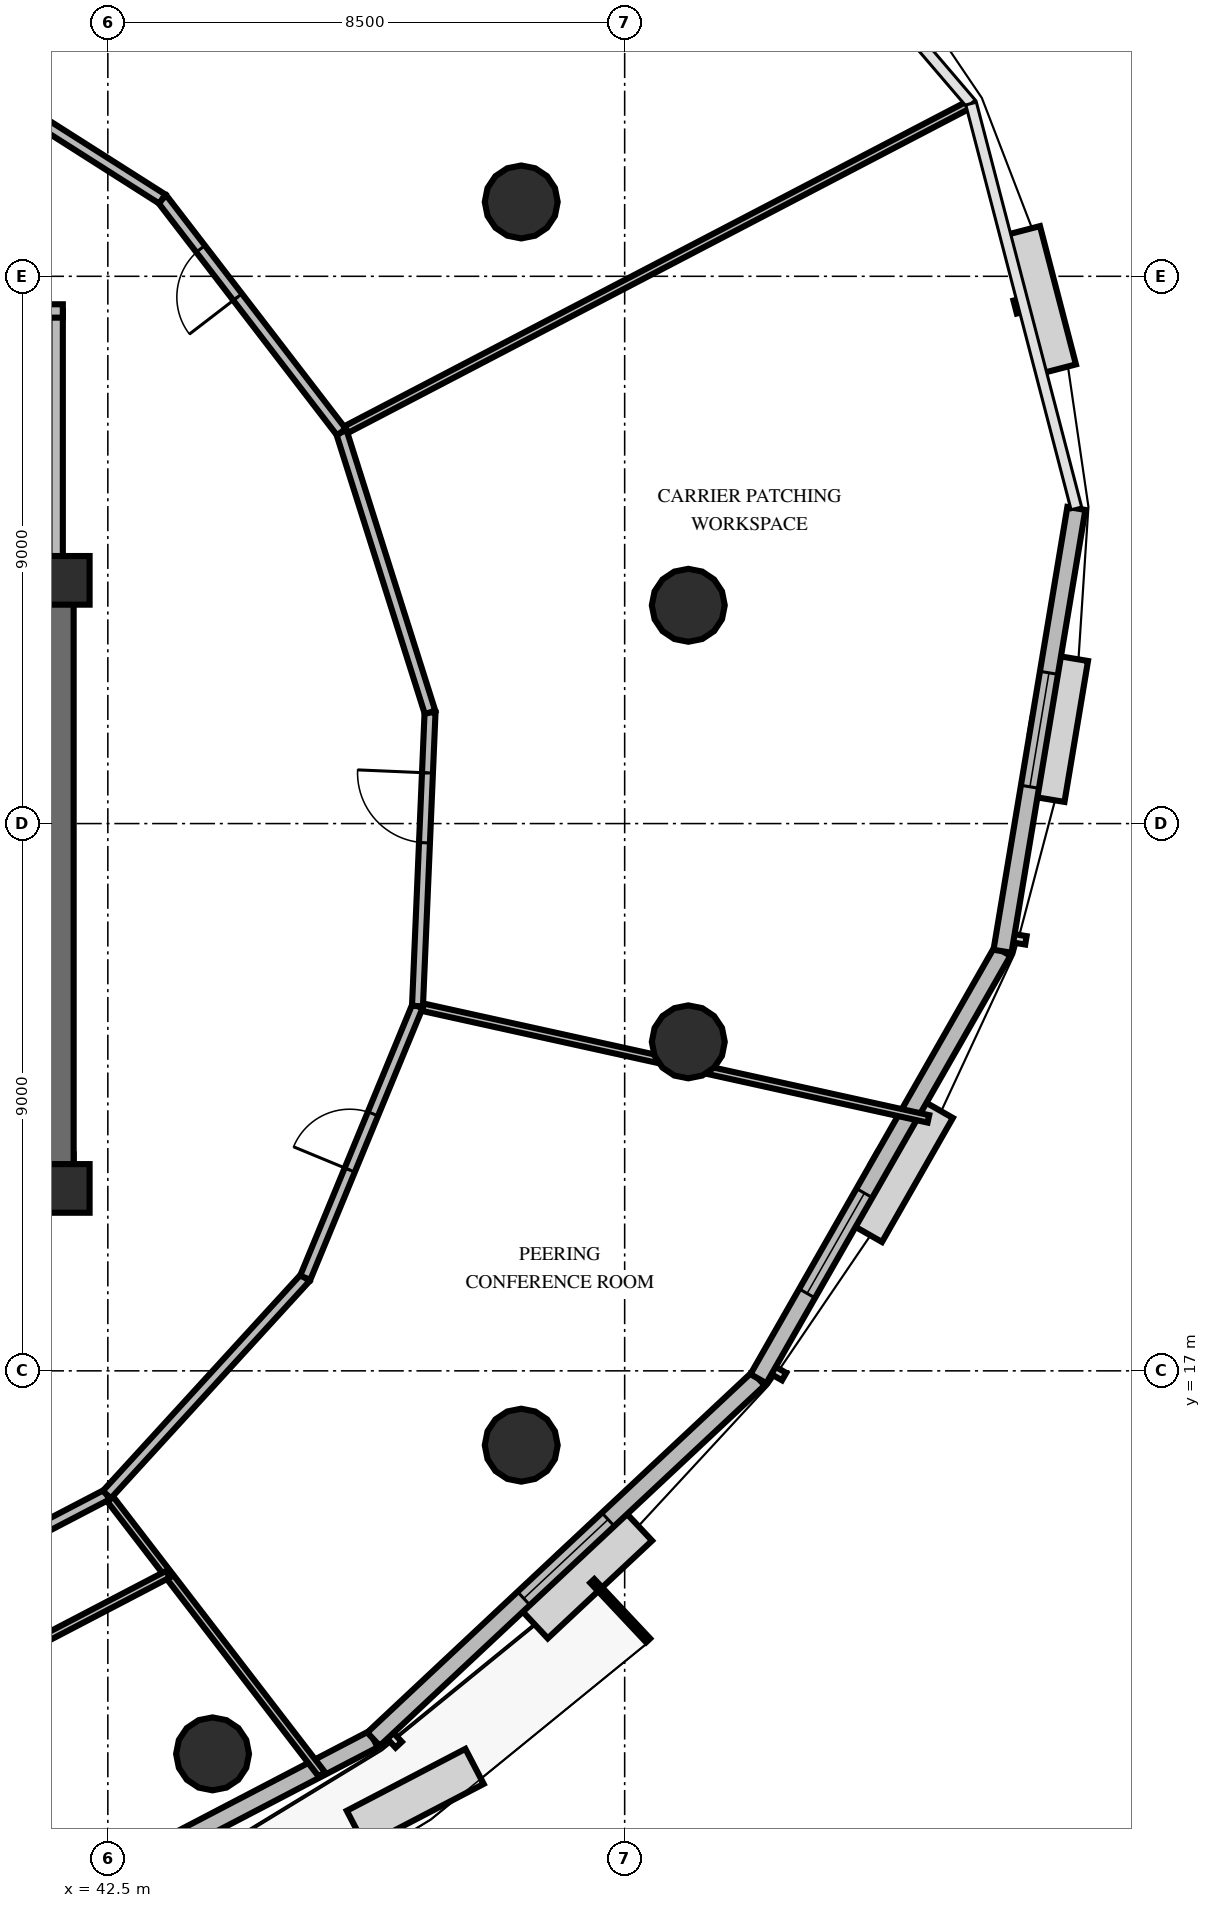
"""IFC4 building model, lengths in metres.
Left out: names, types, materials, properties, quantities, classifications, styles, units other than length and angle.
Written with IfcOpenShell. Run it as: python <this file> out.ifc"""

import sys

from ifc_helpers import new_model, si_unit, direction, frame, frame_2d, origin, origin_2d, place, context, subcontext, project, spatial, rectangle, circle, extrude, element, fill, save


model = new_model("IFC4")
c1 = context("Model", 3, precision=1e-05, world=origin(), true_north=direction((0.0, 1.0)))
c2 = subcontext(c1, "Body", "Model", "MODEL_VIEW")
j1 = project(units=[si_unit("LENGTHUNIT", "METRE"), si_unit("PLANEANGLEUNIT", "RADIAN")], contexts=[c1])
p1 = place(None, origin())
s1 = spatial("IfcSite", under=j1, at=p1, CompositionType="ELEMENT")
p2 = place(p1, origin())
s2 = spatial("IfcBuilding", under=s1, at=p2, CompositionType="ELEMENT")
p3 = place(p2, frame((0.0, 0.0, 149.8)))
s3 = spatial("IfcBuildingStorey", under=s2, at=p3, CompositionType="ELEMENT", Elevation=149.8)
p4 = place(p3, frame((26.072, 20.187, 0.0), z_axis=(0.0, 0.0, 1.0), x_axis=(1.0, 0.0, 0.0)))
e1 = element("IfcWall", 1, at=p4, inside=s3, PredefinedType="SHEAR", context=c2, shape_type="SweptSolid", body=[
    extrude(rectangle(XDim=15.866, YDim=0.75, at=frame_2d((7.933, 0.0))), origin(), (0.0, 0.0, 1.0), 4.0),
])
p5 = place(p3, frame((26.072, 30.013, 0.0), z_axis=(0.0, 0.0, 1.0), x_axis=(1.0, 0.0, 0.0)))
e2 = element("IfcWall", 2, at=p5, inside=s3, PredefinedType="SHEAR", context=c2, shape_type="SweptSolid", body=[
    extrude(rectangle(XDim=15.866, YDim=0.75, at=frame_2d((7.933, 0.0))), origin(), (0.0, 0.0, 1.0), 4.0),
])
p6 = place(p5, frame((0.878, 0.0, 0.0)))
e3 = element("IfcOpeningElement", 3, at=p6, cuts=e2, PredefinedType="OPENING", context=c2, shape_type="SweptSolid", body=[
    extrude(rectangle(XDim=1.05, YDim=2.15, at=frame_2d((0.525, 1.075))), frame((0.0, 0.385, 0.0), z_axis=(0.0, -1.0, 0.0), x_axis=(1.0, 0.0, 0.0)), (0.0, 0.0, 1.0), 0.77),
])
p7 = place(p5, frame((13.928, 0.0, 0.0)))
e4 = element("IfcOpeningElement", 4, at=p7, cuts=e2, PredefinedType="OPENING", context=c2, shape_type="SweptSolid", body=[
    extrude(rectangle(XDim=1.05, YDim=2.15, at=frame_2d((0.525, 1.075))), frame((0.0, 0.385, 0.0), z_axis=(0.0, -1.0, 0.0), x_axis=(1.0, 0.0, 0.0)), (0.0, 0.0, 1.0), 0.77),
])
p8 = place(p5, frame((7.378, 0.0, 0.0)))
e5 = element("IfcOpeningElement", 5, at=p8, cuts=e2, PredefinedType="OPENING", context=c2, shape_type="SweptSolid", body=[
    extrude(rectangle(XDim=1.1, YDim=2.15, at=frame_2d((0.55, 1.075))), frame((0.0, 0.385, 0.0), z_axis=(0.0, -1.0, 0.0), x_axis=(1.0, 0.0, 0.0)), (0.0, 0.0, 1.0), 0.77),
])
p9 = place(p3, frame((41.563, 19.812, 0.0), z_axis=(0.0, 0.0, 1.0), x_axis=(0.0, 1.0, 0.0)))
e6 = element("IfcWall", 6, at=p9, inside=s3, PredefinedType="SHEAR", context=c2, shape_type="SweptSolid", body=[
    extrude(rectangle(XDim=10.576, YDim=0.75, at=frame_2d((5.288, 0.0))), origin(), (0.0, 0.0, 1.0), 4.0),
])
for number, where, z_axis, x_axis in (
    (7, (41.8, 20.0, 0.0), (0.0, 0.0, 1.0), (1.0, 0.0, 0.0)),
    (8, (41.8, 30.0, 0.0), (0.0, 0.0, 1.0), (1.0, 0.0, 0.0)),
):
    element("IfcColumn", number, at=place(p3, frame(where, z_axis=z_axis, x_axis=x_axis)), inside=s3, PredefinedType="PILASTER", context=c2, shape_type="SweptSolid", body=[
        extrude(rectangle(XDim=0.8, YDim=0.8, at=origin_2d()), origin(), (0.0, 0.0, 1.0), 4.0),
    ])
for number, where, z_axis, x_axis in (
    (9, (52.046, 29.59, 0.0), (0.0, 0.0, 1.0), (1.0, 0.0, 0.0)),
    (10, (49.299, 36.222, 0.0), (0.0, 0.0, 1.0), (1.0, 0.0, 0.0)),
    (11, (44.222, 10.701, 0.0), (0.0, 0.0, 1.0), (1.0, 0.0, 0.0)),
    (12, (49.299, 15.778, 0.0), (0.0, 0.0, 1.0), (1.0, 0.0, 0.0)),
    (13, (52.046, 22.41, 0.0), (0.0, 0.0, 1.0), (1.0, 0.0, 0.0)),
):
    element("IfcColumn", number, at=place(p3, frame(where, z_axis=z_axis, x_axis=x_axis)), inside=s3, PredefinedType="COLUMN", context=c2, shape_type="SweptSolid", body=[
        extrude(circle(Radius=0.6, at=origin_2d()), origin(), (0.0, 0.0, 1.0), 4.0),
    ])
p10 = place(p3, frame((38.986, 6.83, 0.0), z_axis=(0.0, 0.0, 1.0), x_axis=(0.886600513761, 0.462535975897, 0.0)))
e14 = element("IfcWall", 14, at=p10, inside=s3, PredefinedType="SOLIDWALL", context=c2, shape_type="SweptSolid", body=[
    extrude(rectangle(XDim=8.891, YDim=0.3, at=frame_2d((4.445, 0.0))), origin(), (0.0, 0.0, 1.0), 2.9),
])
p11 = place(p10, frame((2.19, 0.0, 0.0)))
e15 = element("IfcOpeningElement", 15, at=p11, cuts=e14, PredefinedType="OPENING", context=c2, shape_type="SweptSolid", body=[
    extrude(rectangle(XDim=1.05, YDim=2.15, at=frame_2d((0.525, 1.075))), frame((0.0, 0.16, 0.0), z_axis=(0.0, -1.0, 0.0), x_axis=(1.0, 0.0, 0.0)), (0.0, 0.0, 1.0), 0.32),
])
p12 = place(p3, frame((46.869, 10.943, 0.0), z_axis=(0.0, 0.0, 1.0), x_axis=(0.729921586767, 0.683530889698, 0.0)))
e16 = element("IfcWall", 16, at=p12, inside=s3, PredefinedType="SOLIDWALL", context=c2, shape_type="SweptSolid", body=[
    extrude(rectangle(XDim=8.673, YDim=0.3, at=frame_2d((4.336, 0.0))), origin(), (0.0, 0.0, 1.0), 2.9),
])
p13 = place(p12, frame((3.386, 0.0, 0.8)))
e17 = element("IfcOpeningElement", 17, at=p13, cuts=e16, PredefinedType="OPENING", context=c2, shape_type="SweptSolid", body=[
    extrude(rectangle(XDim=1.9, YDim=1.95, at=frame_2d((0.95, 0.975))), frame((0.0, 0.16, 0.0), z_axis=(0.0, -1.0, 0.0), x_axis=(1.0, 0.0, 0.0)), (0.0, 0.0, 1.0), 0.32),
])
p14 = place(p3, frame((53.199, 16.871, 0.0), z_axis=(0.0, 0.0, 1.0), x_axis=(0.495931060513, 0.868361896457, 0.0)))
e18 = element("IfcWall", 18, at=p14, inside=s3, PredefinedType="SOLIDWALL", context=c2, shape_type="SweptSolid", body=[
    extrude(rectangle(XDim=8.095, YDim=0.3, at=frame_2d((4.048, 0.0))), origin(), (0.0, 0.0, 1.0), 2.9),
])
p15 = place(p14, frame((1.615, 0.0, 0.8)))
e19 = element("IfcOpeningElement", 19, at=p15, cuts=e18, PredefinedType="OPENING", context=c2, shape_type="SweptSolid", body=[
    extrude(rectangle(XDim=1.9, YDim=1.95, at=frame_2d((0.95, 0.975))), frame((0.0, 0.16, 0.0), z_axis=(0.0, -1.0, 0.0), x_axis=(1.0, 0.0, 0.0)), (0.0, 0.0, 1.0), 0.32),
])
p16 = place(p3, frame((57.214, 23.9, 0.0), z_axis=(0.0, 0.0, 1.0), x_axis=(0.16453840075, 0.986370678132, 0.0)))
e20 = element("IfcWall", 20, at=p16, inside=s3, PredefinedType="SOLIDWALL", context=c2, shape_type="SweptSolid", body=[
    extrude(rectangle(XDim=7.383, YDim=0.3, at=frame_2d((3.692, 0.0))), origin(), (0.0, 0.0, 1.0), 2.9),
])
p17 = place(p16, frame((2.742, 0.0, 0.8)))
e21 = element("IfcOpeningElement", 21, at=p17, cuts=e20, PredefinedType="OPENING", context=c2, shape_type="SweptSolid", body=[
    extrude(rectangle(XDim=1.9, YDim=1.95, at=frame_2d((0.95, 0.975))), frame((0.0, 0.16, 0.0), z_axis=(0.0, -1.0, 0.0), x_axis=(1.0, 0.0, 0.0)), (0.0, 0.0, 1.0), 0.32),
])
p18 = place(p3, frame((41.65, 30.05, 0.0), z_axis=(0.0, 0.0, 1.0), x_axis=(0.0, 1.0, 0.0)))
e22 = element("IfcWall", 22, at=p18, inside=s3, PredefinedType="SOLIDWALL", context=c2, shape_type="SweptSolid", body=[
    extrude(rectangle(XDim=4.38, YDim=0.22, at=frame_2d((2.19, 0.0))), origin(), (0.0, 0.0, 1.0), 2.8),
])
p19 = place(p3, frame((37.45, 34.43, 0.0), z_axis=(0.0, 0.0, 1.0), x_axis=(1.0, 0.0, 0.0)))
e23 = element("IfcWall", 23, at=p19, inside=s3, PredefinedType="SOLIDWALL", context=c2, shape_type="SweptSolid", body=[
    extrude(rectangle(XDim=4.31, YDim=0.22, at=frame_2d((2.155, 0.0))), origin(), (0.0, 0.0, 1.0), 2.8),
])
p20 = place(p19, frame((1.6, 0.0, 0.0)))
e24 = element("IfcOpeningElement", 24, at=p20, cuts=e23, PredefinedType="OPENING", context=c2, shape_type="SweptSolid", body=[
    extrude(rectangle(XDim=1.1, YDim=2.15, at=frame_2d((0.55, 1.075))), frame((0.0, 0.12, 0.0), z_axis=(0.0, -1.0, 0.0), x_axis=(1.0, 0.0, 0.0)), (0.0, 0.0, 1.0), 0.24),
])
p21 = place(p3, frame((42.484, 14.964, 0.0), z_axis=(0.0, 0.0, 1.0), x_axis=(0.609448463094, -0.792825687546, 0.0)))
e25 = element("IfcWall", 25, at=p21, inside=s3, PredefinedType="PARTITIONING", context=c2, shape_type="SweptSolid", body=[
    extrude(rectangle(XDim=5.803, YDim=0.125, at=frame_2d((2.902, 0.0))), origin(), (0.0, 0.0, 1.0), 2.8),
])
p22 = place(p3, frame((38.198, 12.728, 0.0), z_axis=(0.0, 0.0, 1.0), x_axis=(0.886598352784, 0.462540118088, 0.0)))
e26 = element("IfcWall", 26, at=p22, inside=s3, PredefinedType="PARTITIONING", context=c2, shape_type="SweptSolid", body=[
    extrude(rectangle(XDim=4.834, YDim=0.18, at=frame_2d((2.417, 0.0))), origin(), (0.0, 0.0, 1.0), 2.8),
])
p23 = place(p22, frame((1.034, 0.0, 0.0)))
e27 = element("IfcOpeningElement", 27, at=p23, cuts=e26, PredefinedType="OPENING", context=c2, shape_type="SweptSolid", body=[
    extrude(rectangle(XDim=1.0, YDim=2.15, at=frame_2d((0.5, 1.075))), frame((0.0, 0.1, 0.0), z_axis=(0.0, -1.0, 0.0), x_axis=(1.0, 0.0, 0.0)), (0.0, 0.0, 1.0), 0.2),
])
p24 = place(p3, frame((38.695, 11.155, 0.0), z_axis=(0.0, 0.0, 1.0), x_axis=(0.886620264439, 0.462498115333, 0.0)))
e28 = element("IfcWall", 28, at=p24, inside=s3, PredefinedType="PARTITIONING", context=c2, shape_type="SweptSolid", body=[
    extrude(rectangle(XDim=5.407, YDim=0.125, at=frame_2d((2.704, 0.0))), origin(), (0.0, 0.0, 1.0), 2.8),
])
p25 = place(p24, frame((1.204, 0.0, 0.0)))
e29 = element("IfcOpeningElement", 29, at=p25, cuts=e28, PredefinedType="OPENING", context=c2, shape_type="SweptSolid", body=[
    extrude(rectangle(XDim=0.95, YDim=2.15, at=frame_2d((0.475, 1.075))), frame((0.0, 0.073, 0.0), z_axis=(0.0, -1.0, 0.0), x_axis=(1.0, 0.0, 0.0)), (0.0, 0.0, 1.0), 0.145),
])
p26 = place(p3, frame((47.593, 22.999, 0.0), z_axis=(0.0, 0.0, 1.0), x_axis=(0.976480571381, -0.215605412074, 0.0)))
e30 = element("IfcWall", 30, at=p26, inside=s3, PredefinedType="PARTITIONING", context=c2, shape_type="SweptSolid", body=[
    extrude(rectangle(XDim=8.605, YDim=0.125, at=frame_2d((4.302, 0.0))), origin(), (0.0, 0.0, 1.0), 2.8),
])
p27 = place(p3, frame((42.484, 14.964, 0.0), z_axis=(0.0, 0.0, 1.0), x_axis=(0.6749444404, 0.737868553587, 0.0)))
e31 = element("IfcWall", 31, at=p27, inside=s3, PredefinedType="PARTITIONING", context=c2, shape_type="SweptSolid", body=[
    extrude(rectangle(XDim=4.834, YDim=0.18, at=frame_2d((2.417, 0.0))), origin(), (0.0, 0.0, 1.0), 2.8),
])
p28 = place(p3, frame((45.747, 18.531, 0.0), z_axis=(0.0, 0.0, 1.0), x_axis=(0.381884883338, 0.924209898171, 0.0)))
e32 = element("IfcWall", 32, at=p28, inside=s3, PredefinedType="PARTITIONING", context=c2, shape_type="SweptSolid", body=[
    extrude(rectangle(XDim=4.834, YDim=0.18, at=frame_2d((2.417, 0.0))), origin(), (0.0, 0.0, 1.0), 2.8),
])
p29 = place(p28, frame((1.917, 0.0, 0.0)))
e33 = element("IfcOpeningElement", 33, at=p29, cuts=e32, PredefinedType="OPENING", context=c2, shape_type="SweptSolid", body=[
    extrude(rectangle(XDim=1.0, YDim=2.15, at=frame_2d((0.5, 1.075))), frame((0.0, 0.1, 0.0), z_axis=(0.0, -1.0, 0.0), x_axis=(1.0, 0.0, 0.0)), (0.0, 0.0, 1.0), 0.2),
])
p30 = place(p3, frame((46.342, 32.438, 0.0), z_axis=(0.0, 0.0, 1.0), x_axis=(0.886607207031, 0.462523145842, 0.0)))
e34 = element("IfcWall", 34, at=p30, inside=s3, PredefinedType="PARTITIONING", context=c2, shape_type="SweptSolid", body=[
    extrude(rectangle(XDim=11.68, YDim=0.125, at=frame_2d((5.84, 0.0))), origin(), (0.0, 0.0, 1.0), 2.8),
])
p31 = place(p3, frame((47.593, 22.999, 0.0), z_axis=(0.0, 0.0, 1.0), x_axis=(0.042722784695, 0.999086965018, 0.0)))
e35 = element("IfcWall", 35, at=p31, inside=s3, PredefinedType="PARTITIONING", context=c2, shape_type="SweptSolid", body=[
    extrude(rectangle(XDim=4.834, YDim=0.18, at=frame_2d((2.417, 0.0))), origin(), (0.0, 0.0, 1.0), 2.8),
])
p32 = place(p31, frame((2.688, 0.0, 0.0)))
e36 = element("IfcOpeningElement", 36, at=p32, cuts=e35, PredefinedType="OPENING", context=c2, shape_type="SweptSolid", body=[
    extrude(rectangle(XDim=1.15, YDim=2.15, at=frame_2d((0.575, 1.075))), frame((0.0, 0.1, 0.0), z_axis=(0.0, -1.0, 0.0), x_axis=(1.0, 0.0, 0.0)), (0.0, 0.0, 1.0), 0.2),
])
p33 = place(p3, frame((47.799, 27.829, 0.0), z_axis=(0.0, 0.0, 1.0), x_axis=(-0.301554318109, 0.953448998757, 0.0)))
e37 = element("IfcWall", 37, at=p33, inside=s3, PredefinedType="PARTITIONING", context=c2, shape_type="SweptSolid", body=[
    extrude(rectangle(XDim=4.834, YDim=0.18, at=frame_2d((2.417, 0.0))), origin(), (0.0, 0.0, 1.0), 2.8),
])
p34 = place(p3, frame((46.342, 32.438, 0.0), z_axis=(0.0, 0.0, 1.0), x_axis=(-0.609452025555, 0.792822949054, 0.0)))
e38 = element("IfcWall", 38, at=p34, inside=s3, PredefinedType="PARTITIONING", context=c2, shape_type="SweptSolid", body=[
    extrude(rectangle(XDim=4.834, YDim=0.18, at=frame_2d((2.417, 0.0))), origin(), (0.0, 0.0, 1.0), 2.8),
])
p35 = place(p34, frame((2.801, 0.0, 0.0)))
e39 = element("IfcOpeningElement", 39, at=p35, cuts=e38, PredefinedType="OPENING", context=c2, shape_type="SweptSolid", body=[
    extrude(rectangle(XDim=1.0, YDim=2.15, at=frame_2d((0.5, 1.075))), frame((0.0, 0.1, 0.0), z_axis=(0.0, -1.0, 0.0), x_axis=(1.0, 0.0, 0.0)), (0.0, 0.0, 1.0), 0.2),
])
p36 = place(p3, frame((43.395, 36.271, 0.0), z_axis=(0.0, 0.0, 1.0), x_axis=(-0.843858975669, 0.536565027916, 0.0)))
e40 = element("IfcWall", 40, at=p36, inside=s3, PredefinedType="PARTITIONING", context=c2, shape_type="SweptSolid", body=[
    extrude(rectangle(XDim=4.834, YDim=0.18, at=frame_2d((2.417, 0.0))), origin(), (0.0, 0.0, 1.0), 2.8),
])
p37 = place(p13, origin())
e41 = element("IfcWindow", 41, at=p37, inside=s3, PartitioningType="SINGLE_PANEL", PredefinedType="WINDOW", context=c2, shape_type="SweptSolid", body=[
    extrude(rectangle(XDim=1.9, YDim=1.95, at=frame_2d((0.95, 0.975))), frame((0.0, 0.03, 0.0), z_axis=(0.0, -1.0, 0.0), x_axis=(1.0, 0.0, 0.0)), (0.0, 0.0, 1.0), 0.06),
])
fill(e17, e41)
p38 = place(p15, origin())
e42 = element("IfcWindow", 42, at=p38, inside=s3, PartitioningType="SINGLE_PANEL", PredefinedType="WINDOW", context=c2, shape_type="SweptSolid", body=[
    extrude(rectangle(XDim=1.9, YDim=1.95, at=frame_2d((0.95, 0.975))), frame((0.0, 0.03, 0.0), z_axis=(0.0, -1.0, 0.0), x_axis=(1.0, 0.0, 0.0)), (0.0, 0.0, 1.0), 0.06),
])
fill(e19, e42)
p39 = place(p17, origin())
e43 = element("IfcWindow", 43, at=p39, inside=s3, PartitioningType="SINGLE_PANEL", PredefinedType="WINDOW", context=c2, shape_type="SweptSolid", body=[
    extrude(rectangle(XDim=1.9, YDim=1.95, at=frame_2d((0.95, 0.975))), frame((0.0, 0.03, 0.0), z_axis=(0.0, -1.0, 0.0), x_axis=(1.0, 0.0, 0.0)), (0.0, 0.0, 1.0), 0.06),
])
fill(e21, e43)
p40 = place(p29, origin())
e44 = element("IfcDoor", 44, at=p40, inside=s3, OperationType="SINGLE_SWING_LEFT", PredefinedType="DOOR", context=c2, shape_type="SweptSolid", body=[
    extrude(rectangle(XDim=1.0, YDim=2.15, at=frame_2d((0.5, 1.075))), frame((0.0, 0.025, 0.0), z_axis=(0.0, -1.0, 0.0), x_axis=(1.0, 0.0, 0.0)), (0.0, 0.0, 1.0), 0.05),
])
fill(e33, e44)
p41 = place(p32, origin())
e45 = element("IfcDoor", 45, at=p41, inside=s3, OperationType="SINGLE_SWING_RIGHT", PredefinedType="DOOR", context=c2, shape_type="SweptSolid", body=[
    extrude(rectangle(XDim=1.15, YDim=2.15, at=frame_2d((0.575, 1.075))), frame((0.0, 0.025, 0.0), z_axis=(0.0, -1.0, 0.0), x_axis=(1.0, 0.0, 0.0)), (0.0, 0.0, 1.0), 0.05),
])
fill(e36, e45)
p42 = place(p35, origin())
e46 = element("IfcDoor", 46, at=p42, inside=s3, OperationType="SINGLE_SWING_LEFT", PredefinedType="DOOR", context=c2, shape_type="SweptSolid", body=[
    extrude(rectangle(XDim=1.0, YDim=2.15, at=frame_2d((0.5, 1.075))), frame((0.0, 0.025, 0.0), z_axis=(0.0, -1.0, 0.0), x_axis=(1.0, 0.0, 0.0)), (0.0, 0.0, 1.0), 0.05),
])
fill(e39, e46)
save(model, sys.argv[1])
